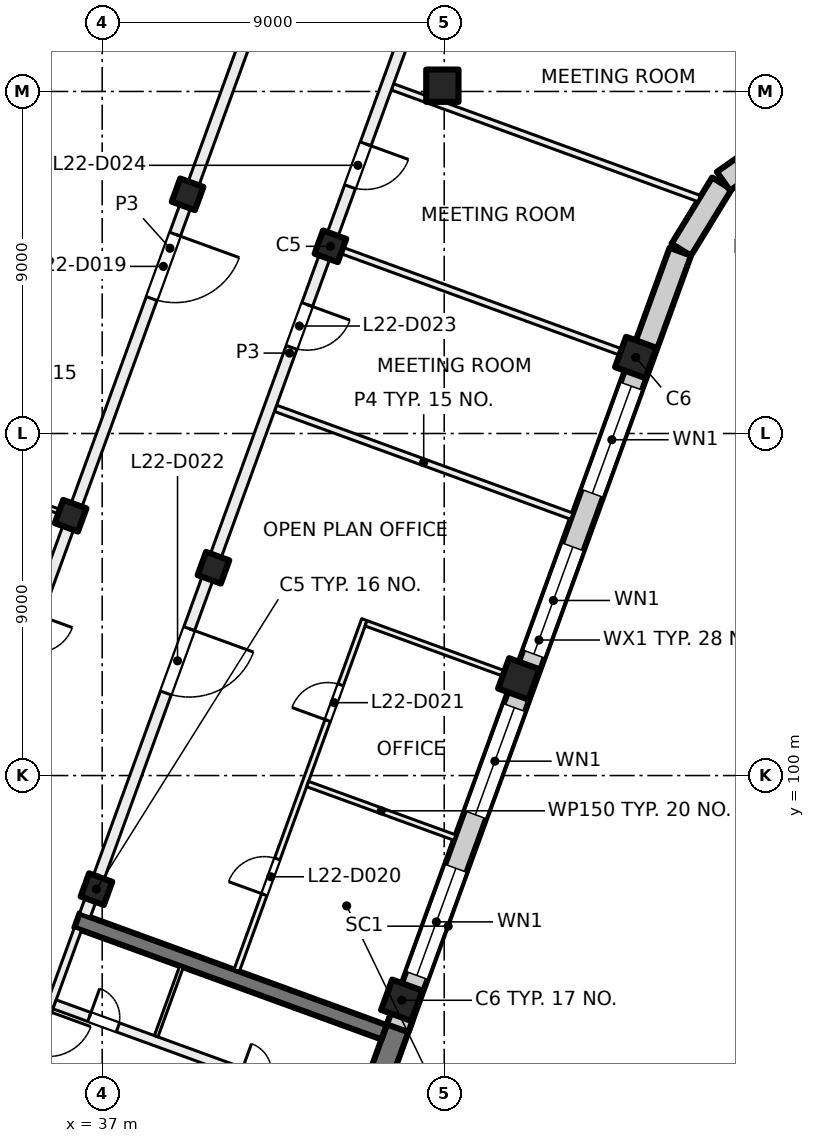
"""IFC4 building model, lengths in metres.
Left out: names, types, materials, properties, quantities, classifications, styles, units other than length and angle.
Written with IfcOpenShell. Run it as: python <this file> out.ifc"""

import sys

from ifc_helpers import new_model, si_unit, direction, frame, frame_2d, origin, origin_2d, place, context, subcontext, project, spatial, rectangle, extrude, element, fill, save


model = new_model("IFC4")
c1 = context("Model", 3, precision=1e-05, world=origin(), true_north=direction((0.0, 1.0)))
c2 = subcontext(c1, "Body", "Model", "MODEL_VIEW")
j1 = project(units=[si_unit("LENGTHUNIT", "METRE"), si_unit("PLANEANGLEUNIT", "RADIAN")], contexts=[c1])
p1 = place(None, origin())
s1 = spatial("IfcSite", under=j1, at=p1, CompositionType="ELEMENT")
p2 = place(p1, origin())
s2 = spatial("IfcBuilding", under=s1, at=p2, CompositionType="ELEMENT")
p3 = place(p2, frame((0.0, 0.0, 97.0)))
s3 = spatial("IfcBuildingStorey", under=s2, at=p3, CompositionType="ELEMENT", Elevation=97.0)
p4 = place(p3, frame((45.952, 118.152, 0.0), z_axis=(0.0, 0.0, 1.0), x_axis=(1.0, 0.0, 0.0)))
e1 = element("IfcColumn", 1, at=p4, inside=s3, PredefinedType="COLUMN", context=c2, shape_type="SweptSolid", body=[
    extrude(rectangle(XDim=0.85, YDim=0.85, at=origin_2d()), origin(), (0.0, 0.0, 1.0), 4.0),
])
for number, where, z_axis, x_axis in (
    (2, (43.006, 113.925, 0.0), (0.0, 0.0, 1.0), (-0.342, -0.94, 0.0)),
    (3, (39.927, 105.468, 0.0), (0.0, 0.0, 1.0), (-0.342, -0.94, 0.0)),
    (4, (36.849, 97.011, 0.0), (0.0, 0.0, 1.0), (-0.342, -0.94, 0.0)),
    (5, (39.247, 115.293, 0.0), (0.0, 0.0, 1.0), (-0.342, -0.94, 0.0)),
    (6, (36.169, 106.836, 0.0), (0.0, 0.0, 1.0), (-0.342, -0.94, 0.0)),
):
    element("IfcColumn", number, at=place(p3, frame(where, z_axis=z_axis, x_axis=x_axis)), inside=s3, PredefinedType="COLUMN", context=c2, shape_type="SweptSolid", body=[
        extrude(rectangle(XDim=0.65, YDim=0.65, at=origin_2d()), origin(), (0.0, 0.0, 1.0), 4.0),
    ])
for number, where, z_axis, x_axis in (
    (7, (51.04, 111.001, 0.0), (0.0, 0.0, 1.0), (-0.342, -0.94, 0.0)),
    (8, (47.962, 102.544, 0.0), (0.0, 0.0, 1.0), (-0.342, -0.94, 0.0)),
    (9, (44.884, 94.087, 0.0), (0.0, 0.0, 1.0), (-0.342, -0.94, 0.0)),
):
    element("IfcColumn", number, at=place(p3, frame(where, z_axis=z_axis, x_axis=x_axis)), inside=s3, PredefinedType="COLUMN", context=c2, shape_type="SweptSolid", body=[
        extrude(rectangle(XDim=0.85, YDim=0.85, at=origin_2d()), origin(), (0.0, 0.0, 1.0), 4.0),
    ])
p5 = place(p3, frame((41.827, 85.249, 0.0), z_axis=(0.0, 0.0, 1.0), x_axis=(0.342017595281, 0.939693548195, 0.0)))
e10 = element("IfcWall", 10, at=p5, inside=s3, PredefinedType="SHEAR", context=c2, shape_type="SweptSolid", body=[
    extrude(rectangle(XDim=8.925, YDim=0.6, at=frame_2d((4.462, 0.0))), origin(), (0.0, 0.0, 1.0), 4.0),
])
p6 = place(p3, frame((44.418, 93.245, 0.0), z_axis=(0.0, 0.0, 1.0), x_axis=(-0.93969060187, 0.342025690201, 0.0)))
e11 = element("IfcWall", 11, at=p6, inside=s3, PredefinedType="SHEAR", context=c2, shape_type="SweptSolid", body=[
    extrude(rectangle(XDim=8.6, YDim=0.4, at=frame_2d((4.3, 0.0))), origin(), (0.0, 0.0, 1.0), 4.0),
])
p7 = place(p3, frame((52.212, 113.783, 0.0), z_axis=(0.0, 0.0, 1.0), x_axis=(-0.34202521188, -0.939690775968, 0.0)))
e12 = element("IfcWall", 12, at=p7, inside=s3, PredefinedType="SOLIDWALL", context=c2, shape_type="SweptSolid", body=[
    extrude(rectangle(XDim=21.745, YDim=0.6, at=frame_2d((10.873, 0.0))), origin(), (0.0, 0.0, 1.0), 3.625),
])
p8 = place(p7, frame((3.765, 0.0, 0.9)))
e13 = element("IfcOpeningElement", 13, at=p8, cuts=e12, PredefinedType="OPENING", context=c2, shape_type="SweptSolid", body=[
    extrude(rectangle(XDim=3.0, YDim=2.4, at=frame_2d((1.5, 1.2))), frame((0.0, 0.31, 0.0), z_axis=(0.0, -1.0, 0.0), x_axis=(1.0, 0.0, 0.0)), (0.0, 0.0, 1.0), 0.62),
])
p9 = place(p7, frame((8.265, 0.0, 0.9)))
e14 = element("IfcOpeningElement", 14, at=p9, cuts=e12, PredefinedType="OPENING", context=c2, shape_type="SweptSolid", body=[
    extrude(rectangle(XDim=3.0, YDim=2.4, at=frame_2d((1.5, 1.2))), frame((0.0, 0.31, 0.0), z_axis=(0.0, -1.0, 0.0), x_axis=(1.0, 0.0, 0.0)), (0.0, 0.0, 1.0), 0.62),
])
p10 = place(p7, frame((12.765, 0.0, 0.9)))
e15 = element("IfcOpeningElement", 15, at=p10, cuts=e12, PredefinedType="OPENING", context=c2, shape_type="SweptSolid", body=[
    extrude(rectangle(XDim=3.0, YDim=2.4, at=frame_2d((1.5, 1.2))), frame((0.0, 0.31, 0.0), z_axis=(0.0, -1.0, 0.0), x_axis=(1.0, 0.0, 0.0)), (0.0, 0.0, 1.0), 0.62),
])
p11 = place(p7, frame((17.265, 0.0, 0.9)))
e16 = element("IfcOpeningElement", 16, at=p11, cuts=e12, PredefinedType="OPENING", context=c2, shape_type="SweptSolid", body=[
    extrude(rectangle(XDim=3.0, YDim=2.4, at=frame_2d((1.5, 1.2))), frame((0.0, 0.31, 0.0), z_axis=(0.0, -1.0, 0.0), x_axis=(1.0, 0.0, 0.0)), (0.0, 0.0, 1.0), 0.62),
])
p12 = place(p3, frame((53.305, 115.578, 0.0), z_axis=(0.0, 0.0, 1.0), x_axis=(-0.522402266438, -0.852699168535, 0.0)))
e17 = element("IfcWall", 17, at=p12, inside=s3, PredefinedType="SOLIDWALL", context=c2, shape_type="SweptSolid", body=[
    extrude(rectangle(XDim=2.042, YDim=0.6, at=frame_2d((1.021, 0.0))), origin(), (0.0, 0.0, 1.0), 3.625),
])
p13 = place(p3, frame((55.062, 116.839, 0.0), z_axis=(0.0, 0.0, 1.0), x_axis=(-0.819122269495, -0.573618956815, 0.0)))
e18 = element("IfcWall", 18, at=p13, inside=s3, PredefinedType="SOLIDWALL", context=c2, shape_type="SweptSolid", body=[
    extrude(rectangle(XDim=2.092, YDim=0.6, at=frame_2d((1.046, 0.0))), origin(), (0.0, 0.0, 1.0), 3.625),
])
p14 = place(p3, frame((24.666, 100.669, 0.0), z_axis=(0.0, 0.0, 1.0), x_axis=(0.34201964167, 0.939692803373, 0.0)))
e19 = element("IfcWall", 19, at=p14, inside=s3, PredefinedType="SOLIDWALL", context=c2, shape_type="SweptSolid", body=[
    extrude(rectangle(XDim=32.884, YDim=0.6, at=frame_2d((16.442, 0.0))), origin(), (0.0, 0.0, 1.0), 3.625),
])
p15 = place(p14, frame((1.48, 0.0, 0.9)))
e20 = element("IfcOpeningElement", 20, at=p15, cuts=e19, PredefinedType="OPENING", context=c2, shape_type="SweptSolid", body=[
    extrude(rectangle(XDim=3.0, YDim=2.4, at=frame_2d((1.5, 1.2))), frame((0.0, 0.31, 0.0), z_axis=(0.0, -1.0, 0.0), x_axis=(1.0, 0.0, 0.0)), (0.0, 0.0, 1.0), 0.62),
])
p16 = place(p14, frame((5.98, 0.0, 0.9)))
e21 = element("IfcOpeningElement", 21, at=p16, cuts=e19, PredefinedType="OPENING", context=c2, shape_type="SweptSolid", body=[
    extrude(rectangle(XDim=3.0, YDim=2.4, at=frame_2d((1.5, 1.2))), frame((0.0, 0.31, 0.0), z_axis=(0.0, -1.0, 0.0), x_axis=(1.0, 0.0, 0.0)), (0.0, 0.0, 1.0), 0.62),
])
p17 = place(p14, frame((10.48, 0.0, 0.9)))
e22 = element("IfcOpeningElement", 22, at=p17, cuts=e19, PredefinedType="OPENING", context=c2, shape_type="SweptSolid", body=[
    extrude(rectangle(XDim=3.0, YDim=2.4, at=frame_2d((1.5, 1.2))), frame((0.0, 0.31, 0.0), z_axis=(0.0, -1.0, 0.0), x_axis=(1.0, 0.0, 0.0)), (0.0, 0.0, 1.0), 0.62),
])
p18 = place(p14, frame((14.98, 0.0, 0.9)))
e23 = element("IfcOpeningElement", 23, at=p18, cuts=e19, PredefinedType="OPENING", context=c2, shape_type="SweptSolid", body=[
    extrude(rectangle(XDim=3.0, YDim=2.4, at=frame_2d((1.5, 1.2))), frame((0.0, 0.31, 0.0), z_axis=(0.0, -1.0, 0.0), x_axis=(1.0, 0.0, 0.0)), (0.0, 0.0, 1.0), 0.62),
])
p19 = place(p14, frame((19.48, 0.0, 0.9)))
e24 = element("IfcOpeningElement", 24, at=p19, cuts=e19, PredefinedType="OPENING", context=c2, shape_type="SweptSolid", body=[
    extrude(rectangle(XDim=3.0, YDim=2.4, at=frame_2d((1.5, 1.2))), frame((0.0, 0.31, 0.0), z_axis=(0.0, -1.0, 0.0), x_axis=(1.0, 0.0, 0.0)), (0.0, 0.0, 1.0), 0.62),
])
p20 = place(p14, frame((23.98, 0.0, 0.9)))
e25 = element("IfcOpeningElement", 25, at=p20, cuts=e19, PredefinedType="OPENING", context=c2, shape_type="SweptSolid", body=[
    extrude(rectangle(XDim=3.0, YDim=2.4, at=frame_2d((1.5, 1.2))), frame((0.0, 0.31, 0.0), z_axis=(0.0, -1.0, 0.0), x_axis=(1.0, 0.0, 0.0)), (0.0, 0.0, 1.0), 0.62),
])
p21 = place(p14, frame((28.48, 0.0, 0.9)))
e26 = element("IfcOpeningElement", 26, at=p21, cuts=e19, PredefinedType="OPENING", context=c2, shape_type="SweptSolid", body=[
    extrude(rectangle(XDim=3.0, YDim=2.4, at=frame_2d((1.5, 1.2))), frame((0.0, 0.31, 0.0), z_axis=(0.0, -1.0, 0.0), x_axis=(1.0, 0.0, 0.0)), (0.0, 0.0, 1.0), 0.62),
])
p22 = place(p3, frame((36.362, 95.964, 0.0), z_axis=(0.0, 0.0, 1.0), x_axis=(-0.341995824804, -0.939701471648, 0.0)))
e27 = element("IfcWall", 27, at=p22, inside=s3, PredefinedType="PARTITIONING", context=c2, shape_type="SweptSolid", body=[
    extrude(rectangle(XDim=3.8, YDim=0.2, at=frame_2d((1.9, 0.0))), origin(), (0.0, 0.0, 1.0), 3.625),
])
p23 = place(p22, frame((2.3, 0.0, 0.0)))
e28 = element("IfcOpeningElement", 28, at=p23, cuts=e27, PredefinedType="OPENING", context=c2, shape_type="SweptSolid", body=[
    extrude(rectangle(XDim=1.2, YDim=2.1, at=frame_2d((0.6, 1.05))), frame((0.0, 0.11, 0.0), z_axis=(0.0, -1.0, 0.0), x_axis=(1.0, 0.0, 0.0)), (0.0, 0.0, 1.0), 0.22),
])
p24 = place(p3, frame((35.19, 92.453, 0.0), z_axis=(0.0, 0.0, 1.0), x_axis=(0.939691552312, -0.342023078919, 0.0)))
e29 = element("IfcWall", 29, at=p24, inside=s3, PredefinedType="PARTITIONING", context=c2, shape_type="SweptSolid", body=[
    extrude(rectangle(XDim=8.4, YDim=0.2, at=frame_2d((4.2, 0.0))), origin(), (0.0, 0.0, 1.0), 3.625),
])
p25 = place(p24, frame((5.25, 0.0, 0.0)))
e30 = element("IfcOpeningElement", 30, at=p25, cuts=e29, PredefinedType="OPENING", context=c2, shape_type="SweptSolid", body=[
    extrude(rectangle(XDim=1.5, YDim=2.1, at=frame_2d((0.75, 1.05))), frame((0.0, 0.11, 0.0), z_axis=(0.0, -1.0, 0.0), x_axis=(1.0, 0.0, 0.0)), (0.0, 0.0, 1.0), 0.22),
])
p26 = place(p3, frame((35.746, 93.98, 0.0), z_axis=(0.0, 0.0, 1.0), x_axis=(0.939691552312, -0.342023078919, 0.0)))
e31 = element("IfcWall", 31, at=p26, inside=s3, PredefinedType="PARTITIONING", context=c2, shape_type="SweptSolid", body=[
    extrude(rectangle(XDim=8.4, YDim=0.25, at=frame_2d((4.2, 0.0))), origin(), (0.0, 0.0, 1.0), 3.625),
])
p27 = place(p26, frame((0.975, 0.0, 0.0)))
e32 = element("IfcOpeningElement", 32, at=p27, cuts=e31, PredefinedType="OPENING", context=c2, shape_type="SweptSolid", body=[
    extrude(rectangle(XDim=0.8, YDim=2.1, at=frame_2d((0.4, 1.05))), frame((0.0, 0.135, 0.0), z_axis=(0.0, -1.0, 0.0), x_axis=(1.0, 0.0, 0.0)), (0.0, 0.0, 1.0), 0.27),
])
p28 = place(p26, frame((5.225, 0.0, 0.0)))
e33 = element("IfcOpeningElement", 33, at=p28, cuts=e31, PredefinedType="OPENING", context=c2, shape_type="SweptSolid", body=[
    extrude(rectangle(XDim=0.8, YDim=2.1, at=frame_2d((0.4, 1.05))), frame((0.0, 0.135, 0.0), z_axis=(0.0, -1.0, 0.0), x_axis=(1.0, 0.0, 0.0)), (0.0, 0.0, 1.0), 0.27),
])
p29 = place(p3, frame((39.087, 94.973, 0.0), z_axis=(0.0, 0.0, 1.0), x_axis=(-0.342024501273, -0.939691034611, 0.0)))
e34 = element("IfcWall", 34, at=p29, inside=s3, PredefinedType="PARTITIONING", context=c2, shape_type="SweptSolid", body=[
    extrude(rectangle(XDim=1.95, YDim=0.1, at=frame_2d((0.975, 0.0))), origin(), (0.0, 0.0, 1.0), 3.625),
])
p30 = place(p3, frame((28.275, 109.709, 0.0), z_axis=(0.0, 0.0, 1.0), x_axis=(0.939697205528, -0.342007546586, 0.0)))
e35 = element("IfcWall", 35, at=p30, inside=s3, PredefinedType="PARTITIONING", context=c2, shape_type="SweptSolid", body=[
    extrude(rectangle(XDim=8.301, YDim=0.125, at=frame_2d((4.15, 0.0))), origin(), (0.0, 0.0, 1.0), 3.625),
])
p31 = place(p3, frame((44.686, 130.091, 0.0), z_axis=(0.0, 0.0, 1.0), x_axis=(-0.342017360004, -0.939693633828, 0.0)))
e36 = element("IfcWall", 36, at=p31, inside=s3, PredefinedType="PARTITIONING", context=c2, shape_type="SweptSolid", body=[
    extrude(rectangle(XDim=34.516, YDim=0.3, at=frame_2d((17.258, 0.0))), origin(), (0.0, 0.0, 1.0), 3.625),
])
p32 = place(p31, frame((27.515, 0.0, 0.0)))
e37 = element("IfcOpeningElement", 37, at=p32, cuts=e36, PredefinedType="OPENING", context=c2, shape_type="SweptSolid", body=[
    extrude(rectangle(XDim=1.0, YDim=2.1, at=frame_2d((0.5, 1.05))), frame((0.0, 0.16, 0.0), z_axis=(0.0, -1.0, 0.0), x_axis=(1.0, 0.0, 0.0)), (0.0, 0.0, 1.0), 0.32),
])
p33 = place(p31, frame((16.865, 0.0, 0.0)))
e38 = element("IfcOpeningElement", 38, at=p33, cuts=e36, PredefinedType="OPENING", context=c2, shape_type="SweptSolid", body=[
    extrude(rectangle(XDim=1.8, YDim=2.1, at=frame_2d((0.9, 1.05))), frame((0.0, 0.16, 0.0), z_axis=(0.0, -1.0, 0.0), x_axis=(1.0, 0.0, 0.0)), (0.0, 0.0, 1.0), 0.32),
])
p34 = place(p31, frame((2.554, 0.0, 0.0)))
e39 = element("IfcOpeningElement", 39, at=p34, cuts=e36, PredefinedType="OPENING", context=c2, shape_type="SweptSolid", body=[
    extrude(rectangle(XDim=1.8, YDim=2.1, at=frame_2d((0.9, 1.05))), frame((0.0, 0.16, 0.0), z_axis=(0.0, -1.0, 0.0), x_axis=(1.0, 0.0, 0.0)), (0.0, 0.0, 1.0), 0.32),
])
p35 = place(p3, frame((40.539, 94.87, 0.0), z_axis=(0.0, 0.0, 1.0), x_axis=(0.342082231415, 0.939670020247, 0.0)))
e40 = element("IfcWall", 40, at=p35, inside=s3, PredefinedType="PARTITIONING", context=c2, shape_type="SweptSolid", body=[
    extrude(rectangle(XDim=9.825, YDim=0.15, at=frame_2d((4.912, 0.0))), origin(), (0.0, 0.0, 1.0), 3.625),
])
p36 = place(p35, frame((2.125, 0.0, 0.0)))
e41 = element("IfcOpeningElement", 41, at=p36, cuts=e40, PredefinedType="OPENING", context=c2, shape_type="SweptSolid", body=[
    extrude(rectangle(XDim=1.0, YDim=2.1, at=frame_2d((0.5, 1.05))), frame((0.0, 0.085, 0.0), z_axis=(0.0, -1.0, 0.0), x_axis=(1.0, 0.0, 0.0)), (0.0, 0.0, 1.0), 0.17),
])
p37 = place(p35, frame((7.0, 0.0, 0.0)))
e42 = element("IfcOpeningElement", 42, at=p37, cuts=e40, PredefinedType="OPENING", context=c2, shape_type="SweptSolid", body=[
    extrude(rectangle(XDim=1.0, YDim=2.1, at=frame_2d((0.5, 1.05))), frame((0.0, 0.085, 0.0), z_axis=(0.0, -1.0, 0.0), x_axis=(1.0, 0.0, 0.0)), (0.0, 0.0, 1.0), 0.17),
])
p38 = place(p3, frame((41.561, 109.663, 0.0), z_axis=(0.0, 0.0, 1.0), x_axis=(0.939673986983, -0.342071334939, 0.0)))
e43 = element("IfcWall", 43, at=p38, inside=s3, PredefinedType="PARTITIONING", context=c2, shape_type="SweptSolid", body=[
    extrude(rectangle(XDim=8.3, YDim=0.175, at=frame_2d((4.15, 0.0))), origin(), (0.0, 0.0, 1.0), 3.625),
])
p39 = place(p3, frame((42.405, 99.777, 0.0), z_axis=(0.0, 0.0, 1.0), x_axis=(0.939765774653, -0.341819087808, 0.0)))
e44 = element("IfcWall", 44, at=p39, inside=s3, PredefinedType="PARTITIONING", context=c2, shape_type="SweptSolid", body=[
    extrude(rectangle(XDim=4.125, YDim=0.15, at=frame_2d((2.063, 0.0))), origin(), (0.0, 0.0, 1.0), 3.625),
])
p40 = place(p3, frame((43.1, 113.891, 0.0), z_axis=(0.0, 0.0, 1.0), x_axis=(0.939670544866, -0.342080790328, 0.0)))
e45 = element("IfcWall", 45, at=p40, inside=s3, PredefinedType="PARTITIONING", context=c2, shape_type="SweptSolid", body=[
    extrude(rectangle(XDim=8.3, YDim=0.175, at=frame_2d((4.15, 0.0))), origin(), (0.0, 0.0, 1.0), 3.625),
])
p41 = place(p3, frame((44.639, 118.12, 0.0), z_axis=(0.0, 0.0, 1.0), x_axis=(0.939669707102, -0.342083091593, 0.0)))
e46 = element("IfcWall", 46, at=p41, inside=s3, PredefinedType="PARTITIONING", context=c2, shape_type="SweptSolid", body=[
    extrude(rectangle(XDim=8.589, YDim=0.175, at=frame_2d((4.295, 0.0))), origin(), (0.0, 0.0, 1.0), 3.625),
])
p42 = place(p3, frame((47.314, 125.909, 0.0), z_axis=(0.0, 0.0, 1.0), x_axis=(-0.342010770371, -0.939696032209, 0.0)))
e47 = element("IfcWall", 47, at=p42, inside=s3, PredefinedType="PARTITIONING", context=c2, shape_type="SweptSolid", body=[
    extrude(rectangle(XDim=31.485, YDim=0.3, at=frame_2d((15.742, 0.0))), origin(), (0.0, 0.0, 1.0), 3.625),
])
p43 = place(p42, frame((23.459, 0.0, 0.0)))
e48 = element("IfcOpeningElement", 48, at=p43, cuts=e47, PredefinedType="OPENING", context=c2, shape_type="SweptSolid", body=[
    extrude(rectangle(XDim=1.8, YDim=2.1, at=frame_2d((0.9, 1.05))), frame((0.0, 0.16, 0.0), z_axis=(0.0, -1.0, 0.0), x_axis=(1.0, 0.0, 0.0)), (0.0, 0.0, 1.0), 0.32),
])
p44 = place(p42, frame((14.385, 0.0, 0.0)))
e49 = element("IfcOpeningElement", 49, at=p44, cuts=e47, PredefinedType="OPENING", context=c2, shape_type="SweptSolid", body=[
    extrude(rectangle(XDim=1.2, YDim=2.1, at=frame_2d((0.6, 1.05))), frame((0.0, 0.16, 0.0), z_axis=(0.0, -1.0, 0.0), x_axis=(1.0, 0.0, 0.0)), (0.0, 0.0, 1.0), 0.32),
])
p45 = place(p42, frame((9.885, 0.0, 0.0)))
e50 = element("IfcOpeningElement", 50, at=p45, cuts=e47, PredefinedType="OPENING", context=c2, shape_type="SweptSolid", body=[
    extrude(rectangle(XDim=1.2, YDim=2.1, at=frame_2d((0.6, 1.05))), frame((0.0, 0.16, 0.0), z_axis=(0.0, -1.0, 0.0), x_axis=(1.0, 0.0, 0.0)), (0.0, 0.0, 1.0), 0.32),
])
p46 = place(p42, frame((5.384, 0.0, 0.0)))
e51 = element("IfcOpeningElement", 51, at=p46, cuts=e47, PredefinedType="OPENING", context=c2, shape_type="SweptSolid", body=[
    extrude(rectangle(XDim=1.2, YDim=2.1, at=frame_2d((0.6, 1.05))), frame((0.0, 0.16, 0.0), z_axis=(0.0, -1.0, 0.0), x_axis=(1.0, 0.0, 0.0)), (0.0, 0.0, 1.0), 0.32),
])
p47 = place(p3, frame((43.944, 104.006, 0.0), z_axis=(0.0, 0.0, 1.0), x_axis=(0.939689717042, -0.34202812119, 0.0)))
e52 = element("IfcWall", 52, at=p47, inside=s3, PredefinedType="PARTITIONING", context=c2, shape_type="SweptSolid", body=[
    extrude(rectangle(XDim=4.126, YDim=0.15, at=frame_2d((2.063, 0.0))), origin(), (0.0, 0.0, 1.0), 3.625),
])
p48 = place(p8, origin())
e53 = element("IfcWindow", 53, at=p48, inside=s3, PartitioningType="SINGLE_PANEL", PredefinedType="WINDOW", context=c2, shape_type="SweptSolid", body=[
    extrude(rectangle(XDim=3.0, YDim=2.4, at=frame_2d((1.5, 1.2))), frame((0.0, 0.03, 0.0), z_axis=(0.0, -1.0, 0.0), x_axis=(1.0, 0.0, 0.0)), (0.0, 0.0, 1.0), 0.06),
])
fill(e13, e53)
p49 = place(p9, origin())
e54 = element("IfcWindow", 54, at=p49, inside=s3, PartitioningType="SINGLE_PANEL", PredefinedType="WINDOW", context=c2, shape_type="SweptSolid", body=[
    extrude(rectangle(XDim=3.0, YDim=2.4, at=frame_2d((1.5, 1.2))), frame((0.0, 0.03, 0.0), z_axis=(0.0, -1.0, 0.0), x_axis=(1.0, 0.0, 0.0)), (0.0, 0.0, 1.0), 0.06),
])
fill(e14, e54)
p50 = place(p10, origin())
e55 = element("IfcWindow", 55, at=p50, inside=s3, PartitioningType="SINGLE_PANEL", PredefinedType="WINDOW", context=c2, shape_type="SweptSolid", body=[
    extrude(rectangle(XDim=3.0, YDim=2.4, at=frame_2d((1.5, 1.2))), frame((0.0, 0.03, 0.0), z_axis=(0.0, -1.0, 0.0), x_axis=(1.0, 0.0, 0.0)), (0.0, 0.0, 1.0), 0.06),
])
fill(e15, e55)
p51 = place(p11, origin())
e56 = element("IfcWindow", 56, at=p51, inside=s3, PartitioningType="SINGLE_PANEL", PredefinedType="WINDOW", context=c2, shape_type="SweptSolid", body=[
    extrude(rectangle(XDim=3.0, YDim=2.4, at=frame_2d((1.5, 1.2))), frame((0.0, 0.03, 0.0), z_axis=(0.0, -1.0, 0.0), x_axis=(1.0, 0.0, 0.0)), (0.0, 0.0, 1.0), 0.06),
])
fill(e16, e56)
p52 = place(p27, origin())
e57 = element("IfcDoor", 57, at=p52, inside=s3, OperationType="SINGLE_SWING_RIGHT", PredefinedType="DOOR", context=c2, shape_type="SweptSolid", body=[
    extrude(rectangle(XDim=0.8, YDim=2.1, at=frame_2d((0.4, 1.05))), frame((0.0, 0.025, 0.0), z_axis=(0.0, -1.0, 0.0), x_axis=(1.0, 0.0, 0.0)), (0.0, 0.0, 1.0), 0.05),
])
fill(e32, e57)
p53 = place(p33, origin())
e58 = element("IfcDoor", 58, at=p53, inside=s3, OperationType="DOUBLE_DOOR_SINGLE_SWING", PredefinedType="DOOR", context=c2, shape_type="SweptSolid", body=[
    extrude(rectangle(XDim=1.8, YDim=2.1, at=frame_2d((0.9, 1.05))), frame((0.0, 0.025, 0.0), z_axis=(0.0, -1.0, 0.0), x_axis=(1.0, 0.0, 0.0)), (0.0, 0.0, 1.0), 0.05),
])
fill(e38, e58)
p54 = place(p36, origin())
e59 = element("IfcDoor", 59, at=p54, inside=s3, OperationType="SINGLE_SWING_LEFT", PredefinedType="DOOR", context=c2, shape_type="SweptSolid", body=[
    extrude(rectangle(XDim=1.0, YDim=2.1, at=frame_2d((0.5, 1.05))), frame((0.0, 0.025, 0.0), z_axis=(0.0, -1.0, 0.0), x_axis=(1.0, 0.0, 0.0)), (0.0, 0.0, 1.0), 0.05),
])
fill(e41, e59)
p55 = place(p37, origin())
e60 = element("IfcDoor", 60, at=p55, inside=s3, OperationType="SINGLE_SWING_LEFT", PredefinedType="DOOR", context=c2, shape_type="SweptSolid", body=[
    extrude(rectangle(XDim=1.0, YDim=2.1, at=frame_2d((0.5, 1.05))), frame((0.0, 0.025, 0.0), z_axis=(0.0, -1.0, 0.0), x_axis=(1.0, 0.0, 0.0)), (0.0, 0.0, 1.0), 0.05),
])
fill(e42, e60)
p56 = place(p43, origin())
e61 = element("IfcDoor", 61, at=p56, inside=s3, OperationType="DOUBLE_DOOR_SINGLE_SWING", PredefinedType="DOOR", context=c2, shape_type="SweptSolid", body=[
    extrude(rectangle(XDim=1.8, YDim=2.1, at=frame_2d((0.9, 1.05))), frame((0.0, 0.025, 0.0), z_axis=(0.0, -1.0, 0.0), x_axis=(1.0, 0.0, 0.0)), (0.0, 0.0, 1.0), 0.05),
])
fill(e48, e61)
p57 = place(p44, origin())
e62 = element("IfcDoor", 62, at=p57, inside=s3, OperationType="DOUBLE_DOOR_SINGLE_SWING", PredefinedType="DOOR", context=c2, shape_type="SweptSolid", body=[
    extrude(rectangle(XDim=1.2, YDim=2.1, at=frame_2d((0.6, 1.05))), frame((0.0, 0.025, 0.0), z_axis=(0.0, -1.0, 0.0), x_axis=(1.0, 0.0, 0.0)), (0.0, 0.0, 1.0), 0.05),
])
fill(e49, e62)
p58 = place(p45, origin())
e63 = element("IfcDoor", 63, at=p58, inside=s3, OperationType="DOUBLE_DOOR_SINGLE_SWING", PredefinedType="DOOR", context=c2, shape_type="SweptSolid", body=[
    extrude(rectangle(XDim=1.2, YDim=2.1, at=frame_2d((0.6, 1.05))), frame((0.0, 0.025, 0.0), z_axis=(0.0, -1.0, 0.0), x_axis=(1.0, 0.0, 0.0)), (0.0, 0.0, 1.0), 0.05),
])
fill(e50, e63)
save(model, sys.argv[1])
